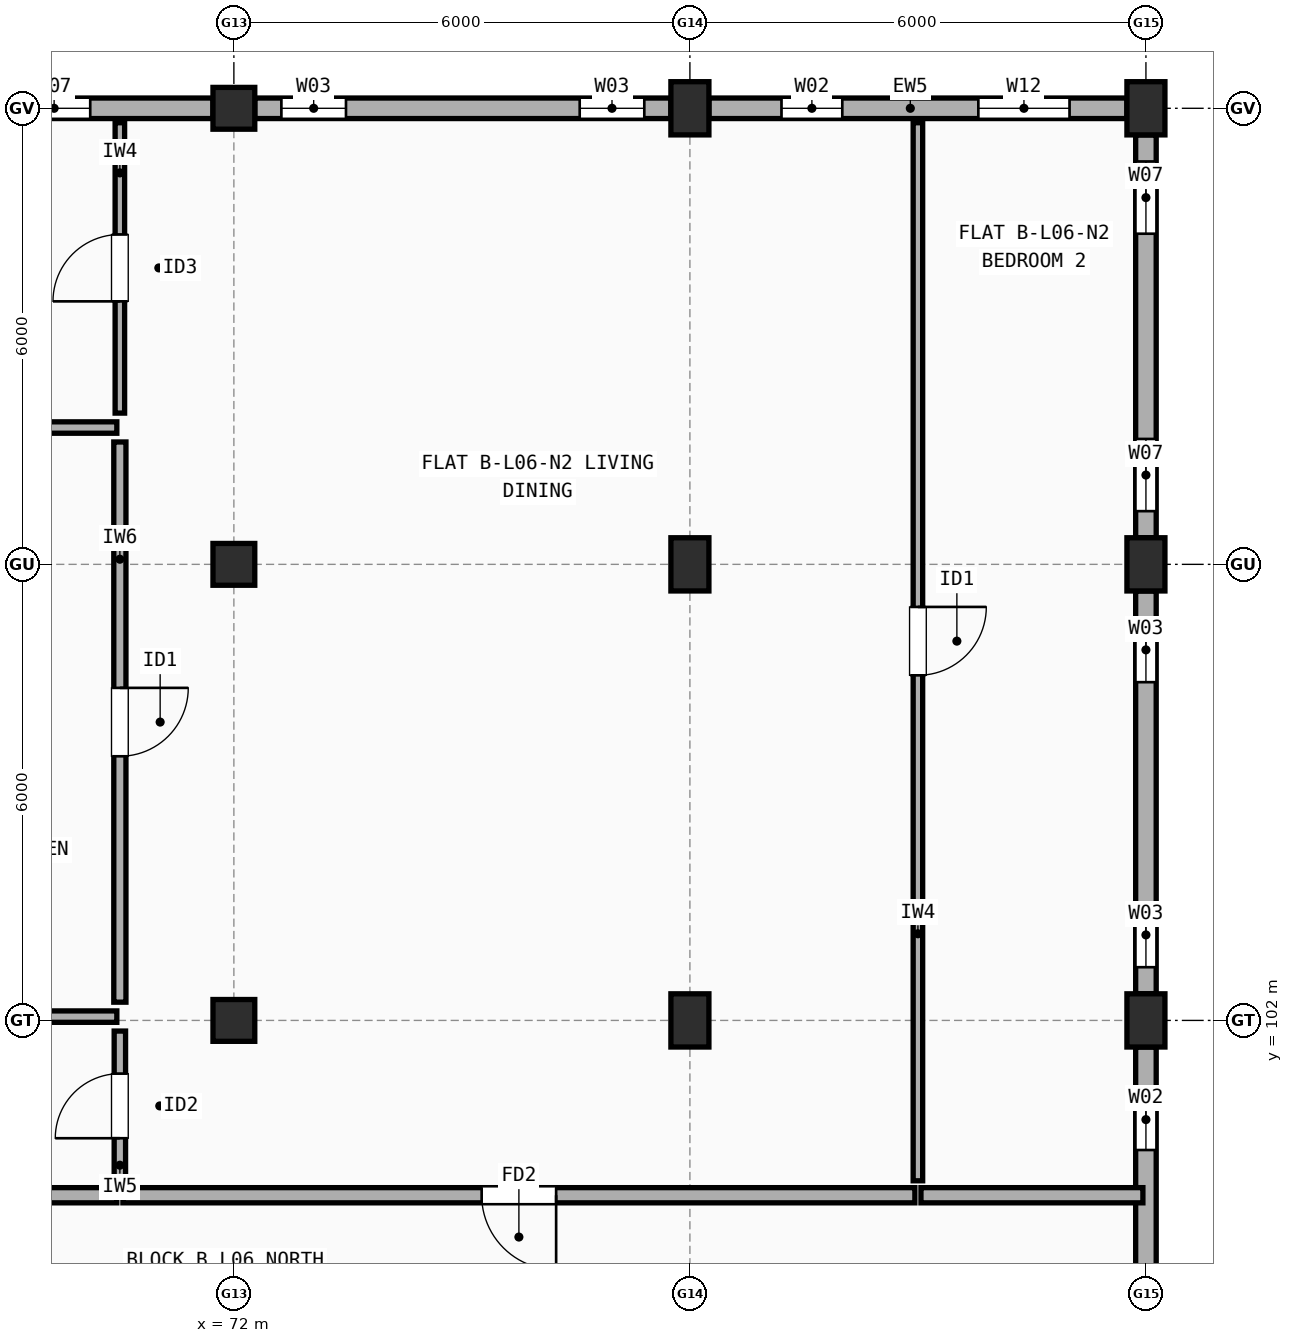
"""IFC4 building model, lengths in metres.
Left out: names, types, materials, properties, quantities, classifications, styles, units other than length and angle.
Written with IfcOpenShell. Run it as: python <this file> out.ifc"""

import sys

from ifc_helpers import new_model, si_unit, direction, frame, frame_2d, origin, origin_2d, place, context, subcontext, project, spatial, rectangle, extrude, element, fill, save


model = new_model("IFC4")
c1 = context("Model", 3, precision=1e-05, world=origin(), true_north=direction((0.0, 1.0)))
c2 = subcontext(c1, "Body", "Model", "MODEL_VIEW")
j1 = project(units=[si_unit("LENGTHUNIT", "METRE"), si_unit("PLANEANGLEUNIT", "RADIAN")], contexts=[c1])
p1 = place(None, origin())
s1 = spatial("IfcSite", under=j1, at=p1, CompositionType="ELEMENT")
p2 = place(p1, origin())
s2 = spatial("IfcBuilding", under=s1, at=p2, CompositionType="ELEMENT")
p3 = place(p2, frame((0.0, 0.0, 20.5)))
s3 = spatial("IfcBuildingStorey", under=s2, at=p3, CompositionType="ELEMENT", Elevation=20.5)
for number, where, z_axis, x_axis in (
    (1, (72.0, 102.0, 0.0), (0.0, 0.0, 1.0), (1.0, 0.0, 0.0)),
    (2, (72.0, 108.0, 0.0), (0.0, 0.0, 1.0), (1.0, 0.0, 0.0)),
    (3, (72.0, 114.0, 0.0), (0.0, 0.0, 1.0), (1.0, 0.0, 0.0)),
):
    element("IfcColumn", number, at=place(p3, frame(where, z_axis=z_axis, x_axis=x_axis)), inside=s3, PredefinedType="COLUMN", context=c2, shape_type="SweptSolid", body=[
        extrude(rectangle(XDim=0.55, YDim=0.55, at=origin_2d()), origin(), (0.0, 0.0, 1.0), 2.97),
    ])
for number, where, z_axis, x_axis in (
    (4, (78.0, 102.0, 0.0), (0.0, 0.0, 1.0), (1.0, 0.0, 0.0)),
    (5, (78.0, 108.0, 0.0), (0.0, 0.0, 1.0), (1.0, 0.0, 0.0)),
    (6, (78.0, 114.0, 0.0), (0.0, 0.0, 1.0), (1.0, 0.0, 0.0)),
    (7, (84.0, 102.0, 0.0), (0.0, 0.0, 1.0), (1.0, 0.0, 0.0)),
    (8, (84.0, 108.0, 0.0), (0.0, 0.0, 1.0), (1.0, 0.0, 0.0)),
    (9, (84.0, 114.0, 0.0), (0.0, 0.0, 1.0), (1.0, 0.0, 0.0)),
):
    element("IfcColumn", number, at=place(p3, frame(where, z_axis=z_axis, x_axis=x_axis)), inside=s3, PredefinedType="COLUMN", context=c2, shape_type="SweptSolid", body=[
        extrude(rectangle(XDim=0.5, YDim=0.7, at=origin_2d()), origin(), (0.0, 0.0, 1.0), 2.97),
    ])
p4 = place(p3, frame((84.0, 96.35, 0.0), z_axis=(0.0, 0.0, 1.0), x_axis=(0.0, 1.0, 0.0)))
e10 = element("IfcWall", 10, at=p4, inside=s3, PredefinedType="STANDARD", context=c2, shape_type="SweptSolid", body=[
    extrude(rectangle(XDim=5.3, YDim=0.27, at=frame_2d((2.65, 0.0))), origin(), (0.0, 0.0, 1.0), 2.452),
])
p5 = place(p4, frame((1.055, 0.0, 0.9)))
e11 = element("IfcOpeningElement", 11, at=p5, cuts=e10, PredefinedType="OPENING", context=c2, shape_type="SweptSolid", body=[
    extrude(rectangle(XDim=1.2, YDim=1.35, at=frame_2d((0.6, 0.675))), frame((0.0, 0.145, 0.0), z_axis=(0.0, -1.0, 0.0), x_axis=(1.0, 0.0, 0.0)), (0.0, 0.0, 1.0), 0.29),
])
p6 = place(p4, frame((3.945, 0.0, 0.9)))
e12 = element("IfcOpeningElement", 12, at=p6, cuts=e10, PredefinedType="OPENING", context=c2, shape_type="SweptSolid", body=[
    extrude(rectangle(XDim=0.8, YDim=1.2, at=frame_2d((0.4, 0.6))), frame((0.0, 0.145, 0.0), z_axis=(0.0, -1.0, 0.0), x_axis=(1.0, 0.0, 0.0)), (0.0, 0.0, 1.0), 0.29),
])
p7 = place(p3, frame((84.0, 102.35, 0.0), z_axis=(0.0, 0.0, 1.0), x_axis=(0.0, 1.0, 0.0)))
e13 = element("IfcWall", 13, at=p7, inside=s3, PredefinedType="STANDARD", context=c2, shape_type="SweptSolid", body=[
    extrude(rectangle(XDim=5.3, YDim=0.27, at=frame_2d((2.65, 0.0))), origin(), (0.0, 0.0, 1.0), 2.452),
])
p8 = place(p7, frame((0.35, 0.0, 0.9)))
e14 = element("IfcOpeningElement", 14, at=p8, cuts=e13, PredefinedType="OPENING", context=c2, shape_type="SweptSolid", body=[
    extrude(rectangle(XDim=0.85, YDim=1.25, at=frame_2d((0.425, 0.625))), frame((0.0, 0.145, 0.0), z_axis=(0.0, -1.0, 0.0), x_axis=(1.0, 0.0, 0.0)), (0.0, 0.0, 1.0), 0.29),
])
p9 = place(p7, frame((4.1, 0.0, 0.9)))
e15 = element("IfcOpeningElement", 15, at=p9, cuts=e13, PredefinedType="OPENING", context=c2, shape_type="SweptSolid", body=[
    extrude(rectangle(XDim=0.85, YDim=1.25, at=frame_2d((0.425, 0.625))), frame((0.0, 0.145, 0.0), z_axis=(0.0, -1.0, 0.0), x_axis=(1.0, 0.0, 0.0)), (0.0, 0.0, 1.0), 0.29),
])
p10 = place(p3, frame((84.0, 108.35, 0.0), z_axis=(0.0, 0.0, 1.0), x_axis=(0.0, 1.0, 0.0)))
e16 = element("IfcWall", 16, at=p10, inside=s3, PredefinedType="STANDARD", context=c2, shape_type="SweptSolid", body=[
    extrude(rectangle(XDim=5.3, YDim=0.27, at=frame_2d((2.65, 0.0))), origin(), (0.0, 0.0, 1.0), 2.452),
])
p11 = place(p10, frame((0.35, 0.0, 0.9)))
e17 = element("IfcOpeningElement", 17, at=p11, cuts=e16, PredefinedType="OPENING", context=c2, shape_type="SweptSolid", body=[
    extrude(rectangle(XDim=0.95, YDim=1.35, at=frame_2d((0.475, 0.675))), frame((0.0, 0.145, 0.0), z_axis=(0.0, -1.0, 0.0), x_axis=(1.0, 0.0, 0.0)), (0.0, 0.0, 1.0), 0.29),
])
p12 = place(p10, frame((4.0, 0.0, 0.9)))
e18 = element("IfcOpeningElement", 18, at=p12, cuts=e16, PredefinedType="OPENING", context=c2, shape_type="SweptSolid", body=[
    extrude(rectangle(XDim=0.95, YDim=1.35, at=frame_2d((0.475, 0.675))), frame((0.0, 0.145, 0.0), z_axis=(0.0, -1.0, 0.0), x_axis=(1.0, 0.0, 0.0)), (0.0, 0.0, 1.0), 0.29),
])
p13 = place(p3, frame((83.75, 114.0, 0.0), z_axis=(0.0, 0.0, 1.0), x_axis=(-1.0, 0.0, 0.0)))
e19 = element("IfcWall", 19, at=p13, inside=s3, PredefinedType="STANDARD", context=c2, shape_type="SweptSolid", body=[
    extrude(rectangle(XDim=5.5, YDim=0.27, at=frame_2d((2.75, 0.0))), origin(), (0.0, 0.0, 1.0), 2.452),
])
p14 = place(p13, frame((0.755, 0.0, 0.9)))
e20 = element("IfcOpeningElement", 20, at=p14, cuts=e19, PredefinedType="OPENING", context=c2, shape_type="SweptSolid", body=[
    extrude(rectangle(XDim=1.2, YDim=1.35, at=frame_2d((0.6, 0.675))), frame((0.0, 0.145, 0.0), z_axis=(0.0, -1.0, 0.0), x_axis=(1.0, 0.0, 0.0)), (0.0, 0.0, 1.0), 0.29),
])
p15 = place(p13, frame((3.745, 0.0, 0.9)))
e21 = element("IfcOpeningElement", 21, at=p15, cuts=e19, PredefinedType="OPENING", context=c2, shape_type="SweptSolid", body=[
    extrude(rectangle(XDim=0.8, YDim=1.2, at=frame_2d((0.4, 0.6))), frame((0.0, 0.145, 0.0), z_axis=(0.0, -1.0, 0.0), x_axis=(1.0, 0.0, 0.0)), (0.0, 0.0, 1.0), 0.29),
])
p16 = place(p3, frame((77.75, 114.0, 0.0), z_axis=(0.0, 0.0, 1.0), x_axis=(-1.0, 0.0, 0.0)))
e22 = element("IfcWall", 22, at=p16, inside=s3, PredefinedType="STANDARD", context=c2, shape_type="SweptSolid", body=[
    extrude(rectangle(XDim=5.475, YDim=0.27, at=frame_2d((2.738, 0.0))), origin(), (0.0, 0.0, 1.0), 2.452),
])
p17 = place(p16, frame((0.35, 0.0, 0.9)))
e23 = element("IfcOpeningElement", 23, at=p17, cuts=e22, PredefinedType="OPENING", context=c2, shape_type="SweptSolid", body=[
    extrude(rectangle(XDim=0.85, YDim=1.25, at=frame_2d((0.425, 0.625))), frame((0.0, 0.145, 0.0), z_axis=(0.0, -1.0, 0.0), x_axis=(1.0, 0.0, 0.0)), (0.0, 0.0, 1.0), 0.29),
])
p18 = place(p16, frame((4.275, 0.0, 0.9)))
e24 = element("IfcOpeningElement", 24, at=p18, cuts=e22, PredefinedType="OPENING", context=c2, shape_type="SweptSolid", body=[
    extrude(rectangle(XDim=0.85, YDim=1.25, at=frame_2d((0.425, 0.625))), frame((0.0, 0.145, 0.0), z_axis=(0.0, -1.0, 0.0), x_axis=(1.0, 0.0, 0.0)), (0.0, 0.0, 1.0), 0.29),
])
p19 = place(p3, frame((71.725, 114.0, 0.0), z_axis=(0.0, 0.0, 1.0), x_axis=(-1.0, 0.0, 0.0)))
e25 = element("IfcWall", 25, at=p19, inside=s3, PredefinedType="STANDARD", context=c2, shape_type="SweptSolid", body=[
    extrude(rectangle(XDim=5.45, YDim=0.27, at=frame_2d((2.725, 0.0))), origin(), (0.0, 0.0, 1.0), 2.452),
])
p20 = place(p19, frame((1.615, 0.0, 0.9)))
e26 = element("IfcOpeningElement", 26, at=p20, cuts=e25, PredefinedType="OPENING", context=c2, shape_type="SweptSolid", body=[
    extrude(rectangle(XDim=0.95, YDim=1.35, at=frame_2d((0.475, 0.675))), frame((0.0, 0.145, 0.0), z_axis=(0.0, -1.0, 0.0), x_axis=(1.0, 0.0, 0.0)), (0.0, 0.0, 1.0), 0.29),
])
p21 = place(p19, frame((4.15, 0.0, 0.9)))
e27 = element("IfcOpeningElement", 27, at=p21, cuts=e25, PredefinedType="OPENING", context=c2, shape_type="SweptSolid", body=[
    extrude(rectangle(XDim=0.95, YDim=1.35, at=frame_2d((0.475, 0.675))), frame((0.0, 0.145, 0.0), z_axis=(0.0, -1.0, 0.0), x_axis=(1.0, 0.0, 0.0)), (0.0, 0.0, 1.0), 0.29),
])
p22 = place(p3, frame((66.04, 99.7, 0.0), z_axis=(0.0, 0.0, 1.0), x_axis=(1.0, 0.0, 0.0)))
e28 = element("IfcWall", 28, at=p22, inside=s3, PredefinedType="SOLIDWALL", context=c2, shape_type="SweptSolid", body=[
    extrude(rectangle(XDim=4.42, YDim=0.2, at=frame_2d((2.21, 0.0))), origin(), (0.0, 0.0, 1.0), 2.97),
])
p23 = place(p3, frame((70.54, 99.7, 0.0), z_axis=(0.0, 0.0, 1.0), x_axis=(1.0, 0.0, 0.0)))
e29 = element("IfcWall", 29, at=p23, inside=s3, PredefinedType="SOLIDWALL", context=c2, shape_type="SweptSolid", body=[
    extrude(rectangle(XDim=10.42, YDim=0.2, at=frame_2d((5.21, 0.0))), origin(), (0.0, 0.0, 1.0), 2.452),
])
p24 = place(p23, frame((4.72, 0.0, 0.0)))
e30 = element("IfcOpeningElement", 30, at=p24, cuts=e29, PredefinedType="OPENING", context=c2, shape_type="SweptSolid", body=[
    extrude(rectangle(XDim=0.98, YDim=2.15, at=frame_2d((0.49, 1.075))), frame((0.0, 0.11, 0.0), z_axis=(0.0, -1.0, 0.0), x_axis=(1.0, 0.0, 0.0)), (0.0, 0.0, 1.0), 0.22),
])
p25 = place(p3, frame((70.5, 109.99, 0.0), z_axis=(0.0, 0.0, 1.0), x_axis=(0.0, 1.0, 0.0)))
e31 = element("IfcWall", 31, at=p25, inside=s3, PredefinedType="PARTITIONING", context=c2, shape_type="SweptSolid", body=[
    extrude(rectangle(XDim=3.82, YDim=0.125, at=frame_2d((1.91, 0.0))), origin(), (0.0, 0.0, 1.0), 2.97),
])
p26 = place(p25, frame((1.47, 0.0, 0.0)))
e32 = element("IfcOpeningElement", 32, at=p26, cuts=e31, PredefinedType="OPENING", context=c2, shape_type="SweptSolid", body=[
    extrude(rectangle(XDim=0.88, YDim=2.1, at=frame_2d((0.44, 1.05))), frame((0.0, 0.073, 0.0), z_axis=(0.0, -1.0, 0.0), x_axis=(1.0, 0.0, 0.0)), (0.0, 0.0, 1.0), 0.145),
])
p27 = place(p3, frame((70.5, 102.24, 0.0), z_axis=(0.0, 0.0, 1.0), x_axis=(0.0, 1.0, 0.0)))
e33 = element("IfcWall", 33, at=p27, inside=s3, PredefinedType="PLUMBINGWALL", context=c2, shape_type="SweptSolid", body=[
    extrude(rectangle(XDim=7.37, YDim=0.16, at=frame_2d((3.685, 0.0))), origin(), (0.0, 0.0, 1.0), 2.452),
])
p28 = place(p27, frame((3.235, 0.0, 0.0)))
e34 = element("IfcOpeningElement", 34, at=p28, cuts=e33, PredefinedType="OPENING", context=c2, shape_type="SweptSolid", body=[
    extrude(rectangle(XDim=0.9, YDim=2.1, at=frame_2d((0.45, 1.05))), frame((0.0, 0.09, 0.0), z_axis=(0.0, -1.0, 0.0), x_axis=(1.0, 0.0, 0.0)), (0.0, 0.0, 1.0), 0.18),
])
p29 = place(p3, frame((70.5, 99.89, 0.0), z_axis=(0.0, 0.0, 1.0), x_axis=(0.0, 1.0, 0.0)))
e35 = element("IfcWall", 35, at=p29, inside=s3, PredefinedType="PARTITIONING", context=c2, shape_type="SweptSolid", body=[
    extrude(rectangle(XDim=1.97, YDim=0.15, at=frame_2d((0.985, 0.0))), origin(), (0.0, 0.0, 1.0), 2.97),
])
p30 = place(p29, frame((0.56, 0.0, 0.0)))
e36 = element("IfcOpeningElement", 36, at=p30, cuts=e35, PredefinedType="OPENING", context=c2, shape_type="SweptSolid", body=[
    extrude(rectangle(XDim=0.85, YDim=2.1, at=frame_2d((0.425, 1.05))), frame((0.0, 0.085, 0.0), z_axis=(0.0, -1.0, 0.0), x_axis=(1.0, 0.0, 0.0)), (0.0, 0.0, 1.0), 0.17),
])
p31 = place(p3, frame((66.04, 109.8, 0.0), z_axis=(0.0, 0.0, 1.0), x_axis=(1.0, 0.0, 0.0)))
e37 = element("IfcWall", 37, at=p31, inside=s3, PredefinedType="PARTITIONING", context=c2, shape_type="SweptSolid", body=[
    extrude(rectangle(XDim=4.42, YDim=0.15, at=frame_2d((2.21, 0.0))), origin(), (0.0, 0.0, 1.0), 2.508),
])
p32 = place(p3, frame((66.36, 102.05, 0.0), z_axis=(0.0, 0.0, 1.0), x_axis=(1.0, 0.0, 0.0)))
e38 = element("IfcWall", 38, at=p32, inside=s3, PredefinedType="PARTITIONING", context=c2, shape_type="SweptSolid", body=[
    extrude(rectangle(XDim=4.1, YDim=0.15, at=frame_2d((2.05, 0.0))), origin(), (0.0, 0.0, 1.0), 2.452),
])
p33 = place(p3, frame((81.04, 99.7, 0.0), z_axis=(0.0, 0.0, 1.0), x_axis=(1.0, 0.0, 0.0)))
e39 = element("IfcWall", 39, at=p33, inside=s3, PredefinedType="SOLIDWALL", context=c2, shape_type="SweptSolid", body=[
    extrude(rectangle(XDim=2.92, YDim=0.2, at=frame_2d((1.46, 0.0))), origin(), (0.0, 0.0, 1.0), 2.452),
])
p34 = place(p3, frame((81.0, 99.89, 0.0), z_axis=(0.0, 0.0, 1.0), x_axis=(0.0, 1.0, 0.0)))
e40 = element("IfcWall", 40, at=p34, inside=s3, PredefinedType="PARTITIONING", context=c2, shape_type="SweptSolid", body=[
    extrude(rectangle(XDim=13.92, YDim=0.125, at=frame_2d((6.96, 0.0))), origin(), (0.0, 0.0, 1.0), 2.452),
])
p35 = place(p34, frame((6.65, 0.0, 0.0)))
e41 = element("IfcOpeningElement", 41, at=p35, cuts=e40, PredefinedType="OPENING", context=c2, shape_type="SweptSolid", body=[
    extrude(rectangle(XDim=0.9, YDim=2.1, at=frame_2d((0.45, 1.05))), frame((0.0, 0.073, 0.0), z_axis=(0.0, -1.0, 0.0), x_axis=(1.0, 0.0, 0.0)), (0.0, 0.0, 1.0), 0.145),
])
p36 = place(p6, origin())
e42 = element("IfcWindow", 42, at=p36, inside=s3, PartitioningType="SINGLE_PANEL", PredefinedType="WINDOW", context=c2, shape_type="SweptSolid", body=[
    extrude(rectangle(XDim=0.8, YDim=1.2, at=frame_2d((0.4, 0.6))), frame((0.0, 0.03, 0.0), z_axis=(0.0, -1.0, 0.0), x_axis=(1.0, 0.0, 0.0)), (0.0, 0.0, 1.0), 0.06),
])
fill(e12, e42)
p37 = place(p8, origin())
e43 = element("IfcWindow", 43, at=p37, inside=s3, PartitioningType="SINGLE_PANEL", PredefinedType="WINDOW", context=c2, shape_type="SweptSolid", body=[
    extrude(rectangle(XDim=0.85, YDim=1.25, at=frame_2d((0.425, 0.625))), frame((0.0, 0.03, 0.0), z_axis=(0.0, -1.0, 0.0), x_axis=(1.0, 0.0, 0.0)), (0.0, 0.0, 1.0), 0.06),
])
fill(e14, e43)
p38 = place(p9, origin())
e44 = element("IfcWindow", 44, at=p38, inside=s3, PartitioningType="SINGLE_PANEL", PredefinedType="WINDOW", context=c2, shape_type="SweptSolid", body=[
    extrude(rectangle(XDim=0.85, YDim=1.25, at=frame_2d((0.425, 0.625))), frame((0.0, 0.03, 0.0), z_axis=(0.0, -1.0, 0.0), x_axis=(1.0, 0.0, 0.0)), (0.0, 0.0, 1.0), 0.06),
])
fill(e15, e44)
p39 = place(p11, origin())
e45 = element("IfcWindow", 45, at=p39, inside=s3, PartitioningType="SINGLE_PANEL", PredefinedType="WINDOW", context=c2, shape_type="SweptSolid", body=[
    extrude(rectangle(XDim=0.95, YDim=1.35, at=frame_2d((0.475, 0.675))), frame((0.0, 0.03, 0.0), z_axis=(0.0, -1.0, 0.0), x_axis=(1.0, 0.0, 0.0)), (0.0, 0.0, 1.0), 0.06),
])
fill(e17, e45)
p40 = place(p12, origin())
e46 = element("IfcWindow", 46, at=p40, inside=s3, PartitioningType="SINGLE_PANEL", PredefinedType="WINDOW", context=c2, shape_type="SweptSolid", body=[
    extrude(rectangle(XDim=0.95, YDim=1.35, at=frame_2d((0.475, 0.675))), frame((0.0, 0.03, 0.0), z_axis=(0.0, -1.0, 0.0), x_axis=(1.0, 0.0, 0.0)), (0.0, 0.0, 1.0), 0.06),
])
fill(e18, e46)
p41 = place(p14, origin())
e47 = element("IfcWindow", 47, at=p41, inside=s3, PartitioningType="SINGLE_PANEL", PredefinedType="WINDOW", context=c2, shape_type="SweptSolid", body=[
    extrude(rectangle(XDim=1.2, YDim=1.35, at=frame_2d((0.6, 0.675))), frame((0.0, 0.03, 0.0), z_axis=(0.0, -1.0, 0.0), x_axis=(1.0, 0.0, 0.0)), (0.0, 0.0, 1.0), 0.06),
])
fill(e20, e47)
p42 = place(p15, origin())
e48 = element("IfcWindow", 48, at=p42, inside=s3, PartitioningType="SINGLE_PANEL", PredefinedType="WINDOW", context=c2, shape_type="SweptSolid", body=[
    extrude(rectangle(XDim=0.8, YDim=1.2, at=frame_2d((0.4, 0.6))), frame((0.0, 0.03, 0.0), z_axis=(0.0, -1.0, 0.0), x_axis=(1.0, 0.0, 0.0)), (0.0, 0.0, 1.0), 0.06),
])
fill(e21, e48)
p43 = place(p17, origin())
e49 = element("IfcWindow", 49, at=p43, inside=s3, PartitioningType="SINGLE_PANEL", PredefinedType="WINDOW", context=c2, shape_type="SweptSolid", body=[
    extrude(rectangle(XDim=0.85, YDim=1.25, at=frame_2d((0.425, 0.625))), frame((0.0, 0.03, 0.0), z_axis=(0.0, -1.0, 0.0), x_axis=(1.0, 0.0, 0.0)), (0.0, 0.0, 1.0), 0.06),
])
fill(e23, e49)
p44 = place(p18, origin())
e50 = element("IfcWindow", 50, at=p44, inside=s3, PartitioningType="SINGLE_PANEL", PredefinedType="WINDOW", context=c2, shape_type="SweptSolid", body=[
    extrude(rectangle(XDim=0.85, YDim=1.25, at=frame_2d((0.425, 0.625))), frame((0.0, 0.03, 0.0), z_axis=(0.0, -1.0, 0.0), x_axis=(1.0, 0.0, 0.0)), (0.0, 0.0, 1.0), 0.06),
])
fill(e24, e50)
p45 = place(p20, origin())
e51 = element("IfcWindow", 51, at=p45, inside=s3, PartitioningType="SINGLE_PANEL", PredefinedType="WINDOW", context=c2, shape_type="SweptSolid", body=[
    extrude(rectangle(XDim=0.95, YDim=1.35, at=frame_2d((0.475, 0.675))), frame((0.0, 0.03, 0.0), z_axis=(0.0, -1.0, 0.0), x_axis=(1.0, 0.0, 0.0)), (0.0, 0.0, 1.0), 0.06),
])
fill(e26, e51)
p46 = place(p24, origin())
e52 = element("IfcDoor", 52, at=p46, inside=s3, OperationType="SINGLE_SWING_RIGHT", PredefinedType="DOOR", context=c2, shape_type="SweptSolid", body=[
    extrude(rectangle(XDim=0.98, YDim=2.15, at=frame_2d((0.49, 1.075))), frame((0.0, 0.025, 0.0), z_axis=(0.0, -1.0, 0.0), x_axis=(1.0, 0.0, 0.0)), (0.0, 0.0, 1.0), 0.05),
])
fill(e30, e52)
p47 = place(p26, origin())
e53 = element("IfcDoor", 53, at=p47, inside=s3, OperationType="SINGLE_SWING_LEFT", PredefinedType="DOOR", context=c2, shape_type="SweptSolid", body=[
    extrude(rectangle(XDim=0.88, YDim=2.1, at=frame_2d((0.44, 1.05))), frame((0.0, 0.025, 0.0), z_axis=(0.0, -1.0, 0.0), x_axis=(1.0, 0.0, 0.0)), (0.0, 0.0, 1.0), 0.05),
])
fill(e32, e53)
p48 = place(p28, origin())
e54 = element("IfcDoor", 54, at=p48, inside=s3, OperationType="SINGLE_SWING_RIGHT", PredefinedType="DOOR", context=c2, shape_type="SweptSolid", body=[
    extrude(rectangle(XDim=0.9, YDim=2.1, at=frame_2d((0.45, 1.05))), frame((0.0, 0.025, 0.0), z_axis=(0.0, -1.0, 0.0), x_axis=(1.0, 0.0, 0.0)), (0.0, 0.0, 1.0), 0.05),
])
fill(e34, e54)
p49 = place(p30, origin())
e55 = element("IfcDoor", 55, at=p49, inside=s3, OperationType="SINGLE_SWING_LEFT", PredefinedType="DOOR", context=c2, shape_type="SweptSolid", body=[
    extrude(rectangle(XDim=0.85, YDim=2.1, at=frame_2d((0.425, 1.05))), frame((0.0, 0.025, 0.0), z_axis=(0.0, -1.0, 0.0), x_axis=(1.0, 0.0, 0.0)), (0.0, 0.0, 1.0), 0.05),
])
fill(e36, e55)
p50 = place(p35, origin())
e56 = element("IfcDoor", 56, at=p50, inside=s3, OperationType="SINGLE_SWING_RIGHT", PredefinedType="DOOR", context=c2, shape_type="SweptSolid", body=[
    extrude(rectangle(XDim=0.9, YDim=2.1, at=frame_2d((0.45, 1.05))), frame((0.0, 0.025, 0.0), z_axis=(0.0, -1.0, 0.0), x_axis=(1.0, 0.0, 0.0)), (0.0, 0.0, 1.0), 0.05),
])
fill(e41, e56)
save(model, sys.argv[1])
